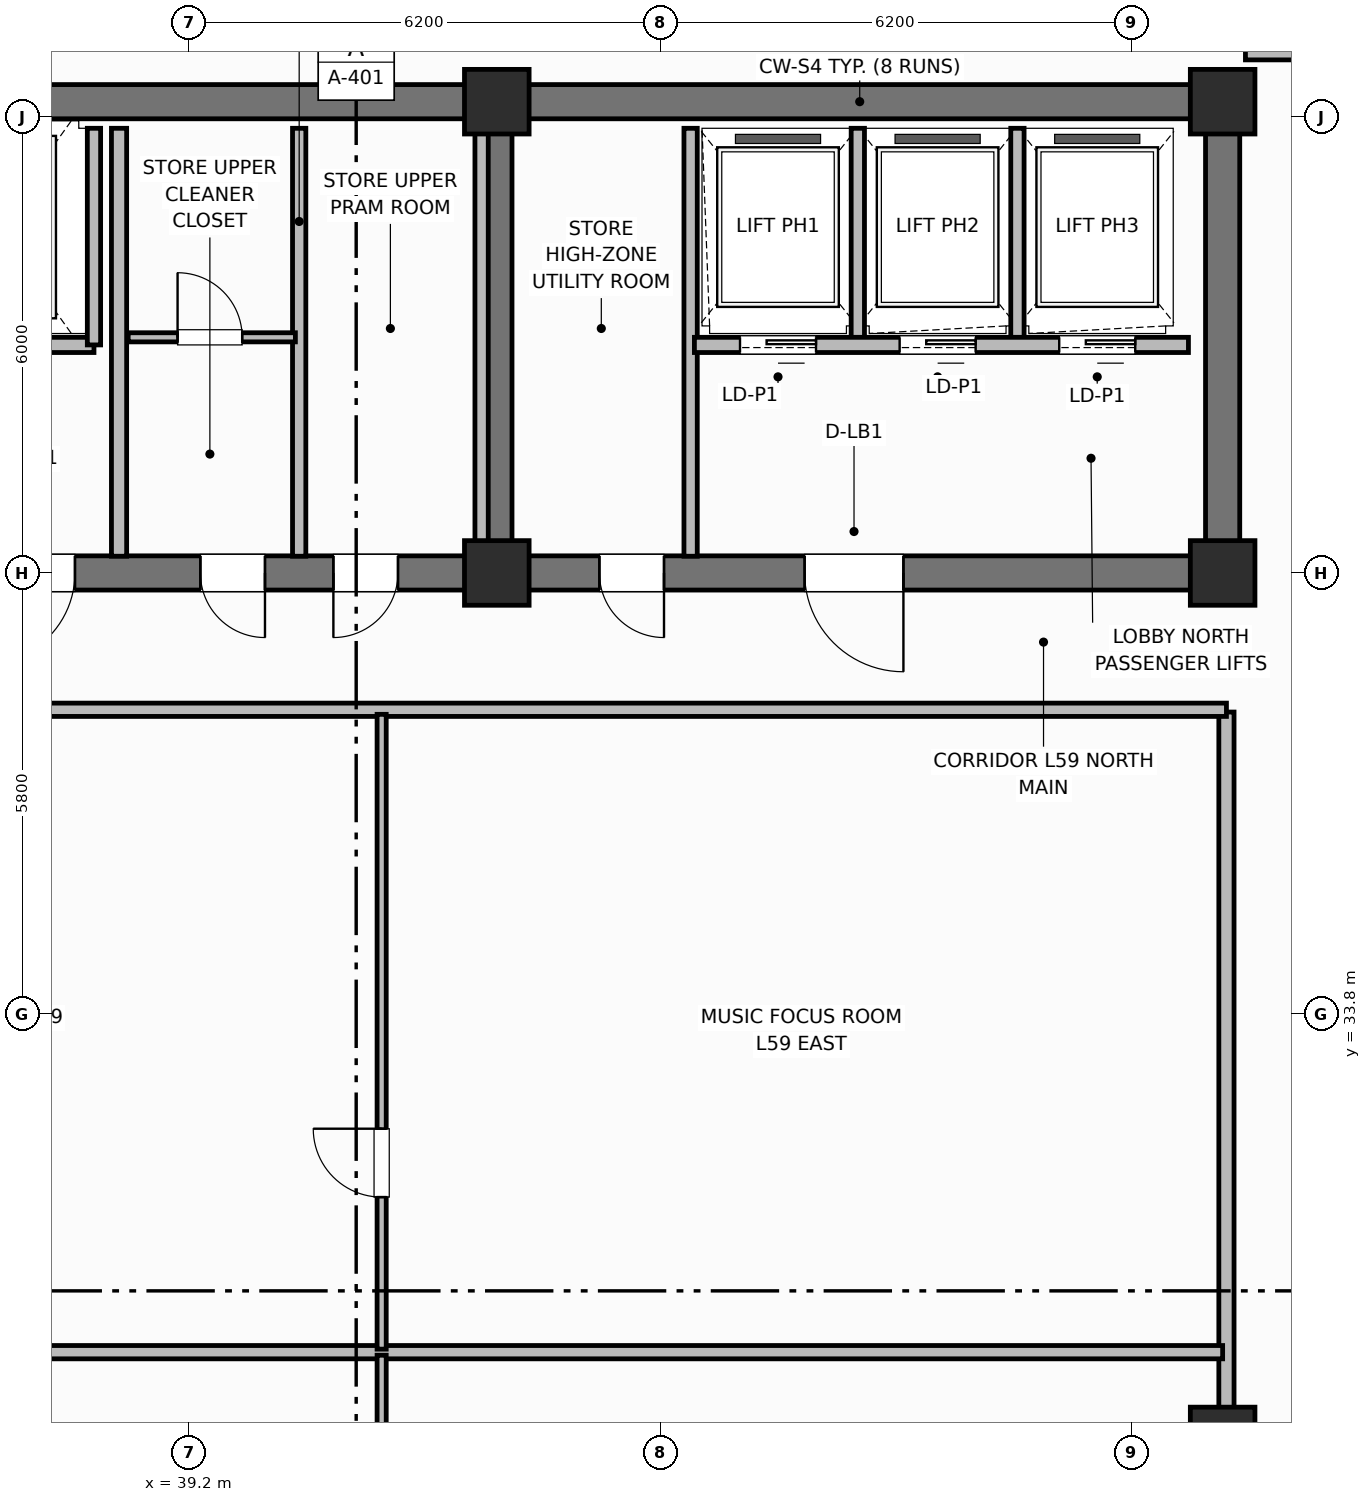
"""IFC4 building model, lengths in metres.
Left out: names, types, materials, properties, quantities, classifications, styles, units other than length and angle.
Written with IfcOpenShell. Run it as: python <this file> out.ifc"""

import sys

from ifc_helpers import new_model, si_unit, direction, frame, frame_2d, origin, origin_2d, place, context, subcontext, project, spatial, rectangle, extrude, element, fill, save


model = new_model("IFC4")
c1 = context("Model", 3, precision=1e-05, world=origin(), true_north=direction((0.0, 1.0)))
c2 = subcontext(c1, "Body", "Model", "MODEL_VIEW")
j1 = project(units=[si_unit("LENGTHUNIT", "METRE"), si_unit("PLANEANGLEUNIT", "RADIAN")], contexts=[c1])
p1 = place(None, origin())
s1 = spatial("IfcSite", under=j1, at=p1, CompositionType="ELEMENT")
p2 = place(p1, origin())
s2 = spatial("IfcBuilding", under=s1, at=p2, CompositionType="ELEMENT")
p3 = place(p2, frame((0.0, 0.0, 236.9)))
s3 = spatial("IfcBuildingStorey", under=s2, at=p3, CompositionType="ELEMENT", Elevation=236.9)
p4 = place(p3, frame((25.6, 45.8, 0.0), z_axis=(0.0, 0.0, 1.0), x_axis=(1.0, 0.0, 0.0)))
e1 = element("IfcWall", 1, at=p4, inside=s3, PredefinedType="SHEAR", context=c2, shape_type="SweptSolid", body=[
    extrude(rectangle(XDim=27.2, YDim=0.45, at=frame_2d((13.6, 0.0))), origin(), (0.0, 0.0, 1.0), 3.7),
])
p5 = place(p3, frame((52.8, 39.825, 0.0), z_axis=(0.0, 0.0, 1.0), x_axis=(0.0, 1.0, 0.0)))
e2 = element("IfcWall", 2, at=p5, inside=s3, PredefinedType="SHEAR", context=c2, shape_type="SweptSolid", body=[
    extrude(rectangle(XDim=5.75, YDim=0.45, at=frame_2d((2.875, 0.0))), origin(), (0.0, 0.0, 1.0), 3.7),
])
p6 = place(p3, frame((52.8, 39.6, 0.0), z_axis=(0.0, 0.0, 1.0), x_axis=(-1.0, 0.0, 0.0)))
e3 = element("IfcWall", 3, at=p6, inside=s3, PredefinedType="SHEAR", context=c2, shape_type="SweptSolid", body=[
    extrude(rectangle(XDim=27.2, YDim=0.45, at=frame_2d((13.6, 0.0))), origin(), (0.0, 0.0, 1.0), 3.7),
])
p7 = place(p6, frame((24.3, 0.0, 0.0)))
e4 = element("IfcOpeningElement", 4, at=p7, cuts=e3, PredefinedType="OPENING", context=c2, shape_type="SweptSolid", body=[
    extrude(rectangle(XDim=1.1, YDim=2.15, at=frame_2d((0.55, 1.075))), frame((0.0, 0.235, 0.0), z_axis=(0.0, -1.0, 0.0), x_axis=(1.0, 0.0, 0.0)), (0.0, 0.0, 1.0), 0.47),
])
p8 = place(p6, frame((21.85, 0.0, 0.0)))
e5 = element("IfcOpeningElement", 5, at=p8, cuts=e3, PredefinedType="OPENING", context=c2, shape_type="SweptSolid", body=[
    extrude(rectangle(XDim=0.85, YDim=2.1, at=frame_2d((0.425, 1.05))), frame((0.0, 0.235, 0.0), z_axis=(0.0, -1.0, 0.0), x_axis=(1.0, 0.0, 0.0)), (0.0, 0.0, 1.0), 0.47),
])
p9 = place(p6, frame((19.85, 0.0, 0.0)))
e6 = element("IfcOpeningElement", 6, at=p9, cuts=e3, PredefinedType="OPENING", context=c2, shape_type="SweptSolid", body=[
    extrude(rectangle(XDim=0.85, YDim=2.1, at=frame_2d((0.425, 1.05))), frame((0.0, 0.235, 0.0), z_axis=(0.0, -1.0, 0.0), x_axis=(1.0, 0.0, 0.0)), (0.0, 0.0, 1.0), 0.47),
])
p10 = place(p6, frame((15.1, 0.0, 0.0)))
e7 = element("IfcOpeningElement", 7, at=p10, cuts=e3, PredefinedType="OPENING", context=c2, shape_type="SweptSolid", body=[
    extrude(rectangle(XDim=1.2, YDim=2.15, at=frame_2d((0.6, 1.075))), frame((0.0, 0.235, 0.0), z_axis=(0.0, -1.0, 0.0), x_axis=(1.0, 0.0, 0.0)), (0.0, 0.0, 1.0), 0.47),
])
p11 = place(p6, frame((12.6, 0.0, 0.0)))
e8 = element("IfcOpeningElement", 8, at=p11, cuts=e3, PredefinedType="OPENING", context=c2, shape_type="SweptSolid", body=[
    extrude(rectangle(XDim=0.85, YDim=2.1, at=frame_2d((0.425, 1.05))), frame((0.0, 0.235, 0.0), z_axis=(0.0, -1.0, 0.0), x_axis=(1.0, 0.0, 0.0)), (0.0, 0.0, 1.0), 0.47),
])
p12 = place(p6, frame((10.85, 0.0, 0.0)))
e9 = element("IfcOpeningElement", 9, at=p12, cuts=e3, PredefinedType="OPENING", context=c2, shape_type="SweptSolid", body=[
    extrude(rectangle(XDim=0.85, YDim=2.1, at=frame_2d((0.425, 1.05))), frame((0.0, 0.235, 0.0), z_axis=(0.0, -1.0, 0.0), x_axis=(1.0, 0.0, 0.0)), (0.0, 0.0, 1.0), 0.47),
])
p13 = place(p6, frame((7.35, 0.0, 0.0)))
e10 = element("IfcOpeningElement", 10, at=p13, cuts=e3, PredefinedType="OPENING", context=c2, shape_type="SweptSolid", body=[
    extrude(rectangle(XDim=0.85, YDim=2.1, at=frame_2d((0.425, 1.05))), frame((0.0, 0.235, 0.0), z_axis=(0.0, -1.0, 0.0), x_axis=(1.0, 0.0, 0.0)), (0.0, 0.0, 1.0), 0.47),
])
p14 = place(p6, frame((4.2, 0.0, 0.0)))
e11 = element("IfcOpeningElement", 11, at=p14, cuts=e3, PredefinedType="OPENING", context=c2, shape_type="SweptSolid", body=[
    extrude(rectangle(XDim=1.3, YDim=2.2, at=frame_2d((0.65, 1.1))), frame((0.0, 0.235, 0.0), z_axis=(0.0, -1.0, 0.0), x_axis=(1.0, 0.0, 0.0)), (0.0, 0.0, 1.0), 0.47),
])
p15 = place(p3, frame((43.25, 39.825, 0.0), z_axis=(0.0, 0.0, 1.0), x_axis=(0.0, 1.0, 0.0)))
e12 = element("IfcWall", 12, at=p15, inside=s3, PredefinedType="SHEAR", context=c2, shape_type="SweptSolid", body=[
    extrude(rectangle(XDim=5.75, YDim=0.4, at=frame_2d((2.875, 0.0))), origin(), (0.0, 0.0, 1.0), 3.7),
])
for number, where, z_axis, x_axis in (
    (13, (43.25, 39.6, 0.0), (0.0, 0.0, 1.0), (1.0, 0.0, 0.0)),
    (14, (43.25, 45.8, 0.0), (0.0, 0.0, 1.0), (1.0, 0.0, 0.0)),
    (15, (52.8, 39.6, 0.0), (0.0, 0.0, 1.0), (1.0, 0.0, 0.0)),
    (16, (52.8, 45.8, 0.0), (0.0, 0.0, 1.0), (1.0, 0.0, 0.0)),
    (17, (52.8, 28.2, 0.0), (0.0, 0.0, 1.0), (1.0, 0.0, 0.0)),
):
    element("IfcColumn", number, at=place(p3, frame(where, z_axis=z_axis, x_axis=x_axis)), inside=s3, PredefinedType="COLUMN", context=c2, shape_type="SweptSolid", body=[
        extrude(rectangle(XDim=0.85, YDim=0.85, at=origin_2d()), origin(), (0.0, 0.0, 1.0), 3.7),
    ])
p16 = place(p3, frame((37.95, 42.6, 0.0), z_axis=(0.0, 0.0, 1.0), x_axis=(-1.0, 0.0, 0.0)))
e18 = element("IfcWall", 18, at=p16, inside=s3, PredefinedType="PARTITIONING", context=c2, shape_type="SweptSolid", body=[
    extrude(rectangle(XDim=2.55, YDim=0.2, at=frame_2d((1.275, 0.0))), origin(), (0.0, 0.0, 1.0), 2.33),
])
p17 = place(p16, frame((0.75, 0.0, 0.0)))
e19 = element("IfcOpeningElement", 19, at=p17, cuts=e18, PredefinedType="OPENING", context=c2, shape_type="SweptSolid", body=[
    extrude(rectangle(XDim=1.1, YDim=2.15, at=frame_2d((0.55, 1.075))), frame((0.0, 0.11, 0.0), z_axis=(0.0, -1.0, 0.0), x_axis=(1.0, 0.0, 0.0)), (0.0, 0.0, 1.0), 0.22),
])
p18 = place(p3, frame((37.95, 42.6, 0.0), z_axis=(0.0, 0.0, 1.0), x_axis=(0.0, 1.0, 0.0)))
e20 = element("IfcWall", 20, at=p18, inside=s3, PredefinedType="PARTITIONING", context=c2, shape_type="SweptSolid", body=[
    extrude(rectangle(XDim=2.85, YDim=0.175, at=frame_2d((1.425, 0.0))), origin(), (0.0, 0.0, 1.0), 2.56),
])
p19 = place(p3, frame((38.28, 39.82, 0.0), z_axis=(0.0, 0.0, 1.0), x_axis=(0.0, 1.0, 0.0)))
e21 = element("IfcWall", 21, at=p19, inside=s3, PredefinedType="PARTITIONING", context=c2, shape_type="SweptSolid", body=[
    extrude(rectangle(XDim=5.63, YDim=0.2, at=frame_2d((2.815, 0.0))), origin(), (0.0, 0.0, 1.0), 2.56),
])
for number, where, z_axis, x_axis in (
    (22, (43.05, 39.82, 0.0), (0.0, 0.0, 1.0), (0.0, 1.0, 0.0)),
    (23, (40.65, 39.82, 0.0), (0.0, 0.0, 1.0), (0.0, 1.0, 0.0)),
):
    element("IfcWall", number, at=place(p3, frame(where, z_axis=z_axis, x_axis=x_axis)), inside=s3, PredefinedType="PARTITIONING", context=c2, shape_type="SweptSolid", body=[
        extrude(rectangle(XDim=5.63, YDim=0.175, at=frame_2d((2.815, 0.0))), origin(), (0.0, 0.0, 1.0), 2.56),
    ])
p20 = place(p3, frame((38.4, 42.7, 0.0), z_axis=(0.0, 0.0, 1.0), x_axis=(1.0, 0.0, 0.0)))
e24 = element("IfcWall", 24, at=p20, inside=s3, PredefinedType="PARTITIONING", context=c2, shape_type="SweptSolid", body=[
    extrude(rectangle(XDim=2.2, YDim=0.12, at=frame_2d((1.1, 0.0))), origin(), (0.0, 0.0, 1.0), 2.33),
])
p21 = place(p20, frame((0.65, 0.0, 0.0)))
e25 = element("IfcOpeningElement", 25, at=p21, cuts=e24, PredefinedType="OPENING", context=c2, shape_type="SweptSolid", body=[
    extrude(rectangle(XDim=0.85, YDim=2.1, at=frame_2d((0.425, 1.05))), frame((0.0, 0.07, 0.0), z_axis=(0.0, -1.0, 0.0), x_axis=(1.0, 0.0, 0.0)), (0.0, 0.0, 1.0), 0.14),
])
p22 = place(p3, frame((45.8, 39.82, 0.0), z_axis=(0.0, 0.0, 1.0), x_axis=(0.0, 1.0, 0.0)))
e26 = element("IfcWall", 26, at=p22, inside=s3, PredefinedType="PARTITIONING", context=c2, shape_type="SweptSolid", body=[
    extrude(rectangle(XDim=5.63, YDim=0.175, at=frame_2d((2.815, 0.0))), origin(), (0.0, 0.0, 1.0), 2.56),
])
for number, where, z_axis, x_axis in (
    (27, (48.0, 42.65, 0.0), (0.0, 0.0, 1.0), (0.0, 1.0, 0.0)),
    (28, (50.1, 42.65, 0.0), (0.0, 0.0, 1.0), (0.0, 1.0, 0.0)),
):
    element("IfcWall", number, at=place(p3, frame(where, z_axis=z_axis, x_axis=x_axis)), inside=s3, PredefinedType="PARTITIONING", context=c2, shape_type="SweptSolid", body=[
        extrude(rectangle(XDim=2.8, YDim=0.175, at=frame_2d((1.4, 0.0))), origin(), (0.0, 0.0, 1.0), 2.56),
    ])
p23 = place(p3, frame((52.35, 42.6, 0.0), z_axis=(0.0, 0.0, 1.0), x_axis=(-1.0, 0.0, 0.0)))
e29 = element("IfcWall", 29, at=p23, inside=s3, PredefinedType="PARTITIONING", context=c2, shape_type="SweptSolid", body=[
    extrude(rectangle(XDim=6.5, YDim=0.2, at=frame_2d((3.25, 0.0))), origin(), (0.0, 0.0, 1.0), 2.56),
])
p24 = place(p23, frame((4.9, 0.0, 0.0)))
e30 = element("IfcOpeningElement", 30, at=p24, cuts=e29, PredefinedType="OPENING", context=c2, shape_type="SweptSolid", body=[
    extrude(rectangle(XDim=1.0, YDim=2.15, at=frame_2d((0.5, 1.075))), frame((0.0, 0.11, 0.0), z_axis=(0.0, -1.0, 0.0), x_axis=(1.0, 0.0, 0.0)), (0.0, 0.0, 1.0), 0.22),
])
p25 = place(p23, frame((2.8, 0.0, 0.0)))
e31 = element("IfcOpeningElement", 31, at=p25, cuts=e29, PredefinedType="OPENING", context=c2, shape_type="SweptSolid", body=[
    extrude(rectangle(XDim=1.0, YDim=2.15, at=frame_2d((0.5, 1.075))), frame((0.0, 0.11, 0.0), z_axis=(0.0, -1.0, 0.0), x_axis=(1.0, 0.0, 0.0)), (0.0, 0.0, 1.0), 0.22),
])
p26 = place(p23, frame((0.7, 0.0, 0.0)))
e32 = element("IfcOpeningElement", 32, at=p26, cuts=e29, PredefinedType="OPENING", context=c2, shape_type="SweptSolid", body=[
    extrude(rectangle(XDim=1.0, YDim=2.15, at=frame_2d((0.5, 1.075))), frame((0.0, 0.11, 0.0), z_axis=(0.0, -1.0, 0.0), x_axis=(1.0, 0.0, 0.0)), (0.0, 0.0, 1.0), 0.22),
])
p27 = place(p3, frame((52.85, 18.63, 0.0), z_axis=(0.0, 0.0, 1.0), x_axis=(0.0, 1.0, 0.0)))
e33 = element("IfcWall", 33, at=p27, inside=s3, PredefinedType="PARTITIONING", context=c2, shape_type="SweptSolid", body=[
    extrude(rectangle(XDim=19.14, YDim=0.2, at=frame_2d((9.57, 0.0))), origin(), (0.0, 0.0, 1.0), 2.56),
])
p28 = place(p3, frame((30.7, 37.8, 0.0), z_axis=(0.0, 0.0, 1.0), x_axis=(1.0, 0.0, 0.0)))
e34 = element("IfcWall", 34, at=p28, inside=s3, PredefinedType="PARTITIONING", context=c2, shape_type="SweptSolid", body=[
    extrude(rectangle(XDim=22.15, YDim=0.175, at=frame_2d((11.075, 0.0))), origin(), (0.0, 0.0, 1.0), 2.56),
])
p29 = place(p3, frame((30.73, 29.348, 0.0), z_axis=(0.0, 0.0, 1.0), x_axis=(1.0, 0.0, 0.0)))
e35 = element("IfcWall", 35, at=p29, inside=s3, PredefinedType="PARTITIONING", context=c2, shape_type="SweptSolid", body=[
    extrude(rectangle(XDim=22.07, YDim=0.175, at=frame_2d((11.035, 0.0))), origin(), (0.0, 0.0, 1.0), 2.56),
])
p30 = place(p3, frame((41.735, 18.66, 0.0), z_axis=(0.0, 0.0, 1.0), x_axis=(0.0, 1.0, 0.0)))
e36 = element("IfcWall", 36, at=p30, inside=s3, PredefinedType="PARTITIONING", context=c2, shape_type="SweptSolid", body=[
    extrude(rectangle(XDim=10.648, YDim=0.12, at=frame_2d((5.324, 0.0))), origin(), (0.0, 0.0, 1.0), 2.56),
])
p31 = place(p30, frame((2.0, 0.0, 0.0)))
e37 = element("IfcOpeningElement", 37, at=p31, cuts=e36, PredefinedType="OPENING", context=c2, shape_type="SweptSolid", body=[
    extrude(rectangle(XDim=0.9, YDim=2.1, at=frame_2d((0.45, 1.05))), frame((0.0, 0.07, 0.0), z_axis=(0.0, -1.0, 0.0), x_axis=(1.0, 0.0, 0.0)), (0.0, 0.0, 1.0), 0.14),
])
p32 = place(p3, frame((41.735, 29.388, 0.0), z_axis=(0.0, 0.0, 1.0), x_axis=(0.0, 1.0, 0.0)))
e38 = element("IfcWall", 38, at=p32, inside=s3, PredefinedType="PARTITIONING", context=c2, shape_type="SweptSolid", body=[
    extrude(rectangle(XDim=8.352, YDim=0.12, at=frame_2d((4.176, 0.0))), origin(), (0.0, 0.0, 1.0), 2.56),
])
p33 = place(p32, frame((2.0, 0.0, 0.0)))
e39 = element("IfcOpeningElement", 39, at=p33, cuts=e38, PredefinedType="OPENING", context=c2, shape_type="SweptSolid", body=[
    extrude(rectangle(XDim=0.9, YDim=2.1, at=frame_2d((0.45, 1.05))), frame((0.0, 0.07, 0.0), z_axis=(0.0, -1.0, 0.0), x_axis=(1.0, 0.0, 0.0)), (0.0, 0.0, 1.0), 0.14),
])
p34 = place(p3, frame((53.1, 46.45, 0.0), z_axis=(0.0, 0.0, 1.0), x_axis=(1.0, 0.0, 0.0)))
e40 = element("IfcWall", 40, at=p34, inside=s3, PredefinedType="PARTITIONING", context=c2, shape_type="SweptSolid", body=[
    extrude(rectangle(XDim=3.754, YDim=0.2, at=frame_2d((1.877, 0.0))), origin(), (0.0, 0.0, 1.0), 2.56),
])
p35 = place(p21, origin())
e41 = element("IfcDoor", 41, at=p35, inside=s3, OperationType="SINGLE_SWING_LEFT", PredefinedType="DOOR", context=c2, shape_type="SweptSolid", body=[
    extrude(rectangle(XDim=0.85, YDim=2.1, at=frame_2d((0.425, 1.05))), frame((0.0, 0.025, 0.0), z_axis=(0.0, -1.0, 0.0), x_axis=(1.0, 0.0, 0.0)), (0.0, 0.0, 1.0), 0.05),
])
fill(e25, e41)
p36 = place(p24, origin())
e42 = element("IfcDoor", 42, at=p36, inside=s3, OperationType="SLIDING_TO_LEFT", PredefinedType="DOOR", context=c2, shape_type="SweptSolid", body=[
    extrude(rectangle(XDim=1.0, YDim=2.15, at=frame_2d((0.5, 1.075))), frame((0.0, 0.025, 0.0), z_axis=(0.0, -1.0, 0.0), x_axis=(1.0, 0.0, 0.0)), (0.0, 0.0, 1.0), 0.05),
])
fill(e30, e42)
p37 = place(p25, origin())
e43 = element("IfcDoor", 43, at=p37, inside=s3, OperationType="SLIDING_TO_LEFT", PredefinedType="DOOR", context=c2, shape_type="SweptSolid", body=[
    extrude(rectangle(XDim=1.0, YDim=2.15, at=frame_2d((0.5, 1.075))), frame((0.0, 0.025, 0.0), z_axis=(0.0, -1.0, 0.0), x_axis=(1.0, 0.0, 0.0)), (0.0, 0.0, 1.0), 0.05),
])
fill(e31, e43)
p38 = place(p26, origin())
e44 = element("IfcDoor", 44, at=p38, inside=s3, OperationType="SLIDING_TO_LEFT", PredefinedType="DOOR", context=c2, shape_type="SweptSolid", body=[
    extrude(rectangle(XDim=1.0, YDim=2.15, at=frame_2d((0.5, 1.075))), frame((0.0, 0.025, 0.0), z_axis=(0.0, -1.0, 0.0), x_axis=(1.0, 0.0, 0.0)), (0.0, 0.0, 1.0), 0.05),
])
fill(e32, e44)
p39 = place(p33, origin())
e45 = element("IfcDoor", 45, at=p39, inside=s3, OperationType="SINGLE_SWING_RIGHT", PredefinedType="DOOR", context=c2, shape_type="SweptSolid", body=[
    extrude(rectangle(XDim=0.9, YDim=2.1, at=frame_2d((0.45, 1.05))), frame((0.0, 0.025, 0.0), z_axis=(0.0, -1.0, 0.0), x_axis=(1.0, 0.0, 0.0)), (0.0, 0.0, 1.0), 0.05),
])
fill(e39, e45)
p40 = place(p10, origin())
e46 = element("IfcDoor", 46, at=p40, inside=s3, OperationType="SINGLE_SWING_RIGHT", PredefinedType="DOOR", context=c2, shape_type="SweptSolid", body=[
    extrude(rectangle(XDim=1.2, YDim=2.15, at=frame_2d((0.6, 1.075))), frame((0.0, 0.025, 0.0), z_axis=(0.0, -1.0, 0.0), x_axis=(1.0, 0.0, 0.0)), (0.0, 0.0, 1.0), 0.05),
])
fill(e7, e46)
p41 = place(p11, origin())
e47 = element("IfcDoor", 47, at=p41, inside=s3, OperationType="SINGLE_SWING_LEFT", PredefinedType="DOOR", context=c2, shape_type="SweptSolid", body=[
    extrude(rectangle(XDim=0.85, YDim=2.1, at=frame_2d((0.425, 1.05))), frame((0.0, 0.025, 0.0), z_axis=(0.0, -1.0, 0.0), x_axis=(1.0, 0.0, 0.0)), (0.0, 0.0, 1.0), 0.05),
])
fill(e8, e47)
p42 = place(p12, origin())
e48 = element("IfcDoor", 48, at=p42, inside=s3, OperationType="SINGLE_SWING_RIGHT", PredefinedType="DOOR", context=c2, shape_type="SweptSolid", body=[
    extrude(rectangle(XDim=0.85, YDim=2.1, at=frame_2d((0.425, 1.05))), frame((0.0, 0.025, 0.0), z_axis=(0.0, -1.0, 0.0), x_axis=(1.0, 0.0, 0.0)), (0.0, 0.0, 1.0), 0.05),
])
fill(e9, e48)
p43 = place(p13, origin())
e49 = element("IfcDoor", 49, at=p43, inside=s3, OperationType="SINGLE_SWING_LEFT", PredefinedType="DOOR", context=c2, shape_type="SweptSolid", body=[
    extrude(rectangle(XDim=0.85, YDim=2.1, at=frame_2d((0.425, 1.05))), frame((0.0, 0.025, 0.0), z_axis=(0.0, -1.0, 0.0), x_axis=(1.0, 0.0, 0.0)), (0.0, 0.0, 1.0), 0.05),
])
fill(e10, e49)
p44 = place(p14, origin())
e50 = element("IfcDoor", 50, at=p44, inside=s3, OperationType="SINGLE_SWING_LEFT", PredefinedType="DOOR", context=c2, shape_type="SweptSolid", body=[
    extrude(rectangle(XDim=1.3, YDim=2.2, at=frame_2d((0.65, 1.1))), frame((0.0, 0.025, 0.0), z_axis=(0.0, -1.0, 0.0), x_axis=(1.0, 0.0, 0.0)), (0.0, 0.0, 1.0), 0.05),
])
fill(e11, e50)
save(model, sys.argv[1])
